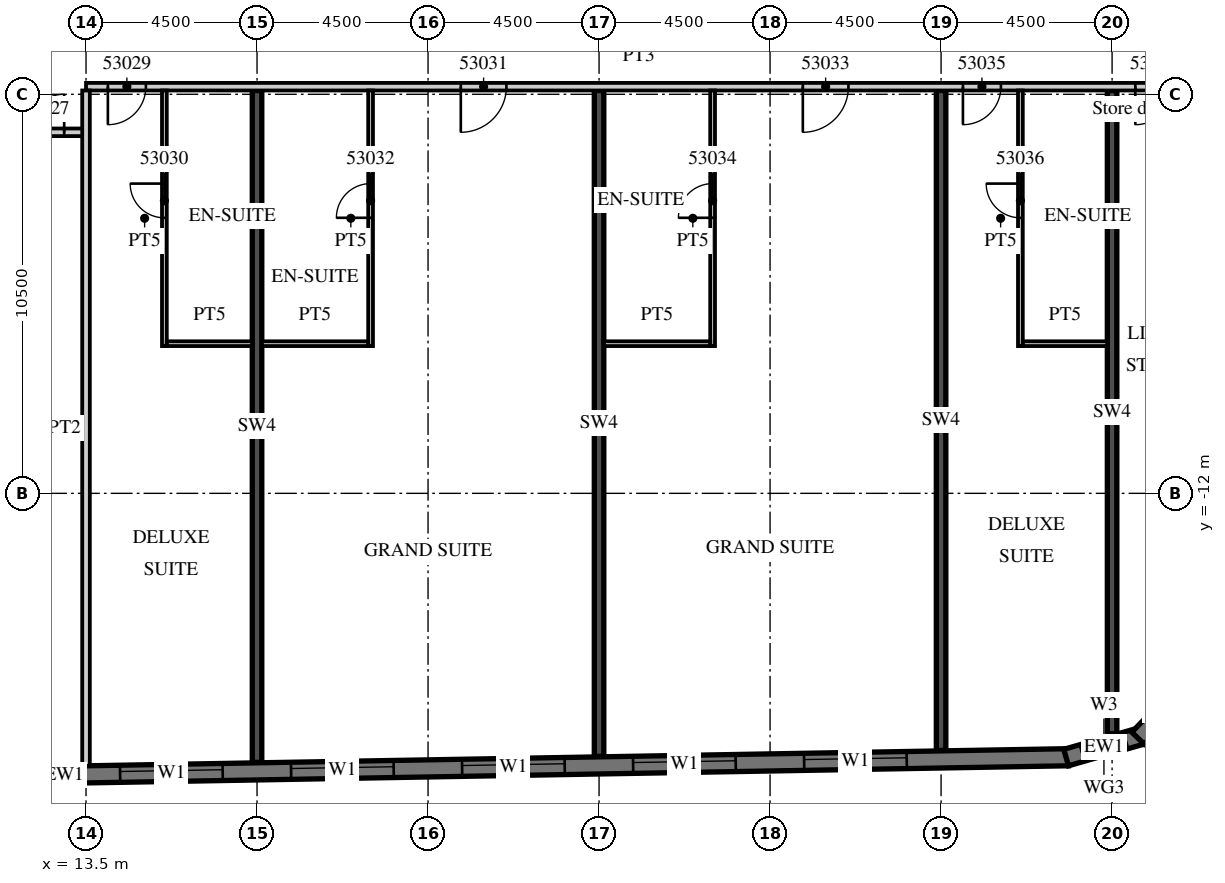
"""IFC4 building model, lengths in metres.
Left out: names, types, materials, properties, quantities, classifications, styles, units other than length and angle.
Written with IfcOpenShell. Run it as: python <this file> out.ifc"""

import sys

from ifc_helpers import new_model, si_unit, direction, frame, frame_2d, origin, place, context, subcontext, project, spatial, polyline, rectangle, outline, extrude, element, fill, save


model = new_model("IFC4")
c1 = context("Model", 3, precision=1e-05, world=origin(), true_north=direction((0.0, 1.0)))
c2 = subcontext(c1, "Body", "Model", "MODEL_VIEW")
j1 = project(units=[si_unit("LENGTHUNIT", "METRE"), si_unit("PLANEANGLEUNIT", "RADIAN")], contexts=[c1])
p1 = place(None, origin())
s1 = spatial("IfcSite", under=j1, at=p1, CompositionType="ELEMENT")
p2 = place(p1, origin())
s2 = spatial("IfcBuilding", under=s1, at=p2, CompositionType="ELEMENT")
p3 = place(p2, frame((0.0, 0.0, 221.0)))
s3 = spatial("IfcBuildingStorey", under=s2, at=p3, CompositionType="ELEMENT", Elevation=221.0)
p4 = place(p3, frame((18.0, -19.079, 0.0), z_axis=(0.0, 0.0, 1.0), x_axis=(0.0, 1.0, 0.0)))
e1 = element("IfcWall", 1, at=p4, inside=s3, PredefinedType="SHEAR", context=c2, shape_type="SweptSolid", body=[
    extrude(rectangle(XDim=17.679, YDim=0.25, at=frame_2d((8.84, 0.0))), origin(), (0.0, 0.0, 1.0), 3.3),
])
p5 = place(p3, frame((27.0, -18.922, 0.0), z_axis=(0.0, 0.0, 1.0), x_axis=(0.0, 1.0, 0.0)))
e2 = element("IfcWall", 2, at=p5, inside=s3, PredefinedType="SHEAR", context=c2, shape_type="SweptSolid", body=[
    extrude(rectangle(XDim=17.522, YDim=0.25, at=frame_2d((8.761, 0.0))), origin(), (0.0, 0.0, 1.0), 3.3),
])
p6 = place(p3, frame((36.0, -18.765, 0.0), z_axis=(0.0, 0.0, 1.0), x_axis=(0.0, 1.0, 0.0)))
e3 = element("IfcWall", 3, at=p6, inside=s3, PredefinedType="SHEAR", context=c2, shape_type="SweptSolid", body=[
    extrude(rectangle(XDim=17.365, YDim=0.25, at=frame_2d((8.683, 0.0))), origin(), (0.0, 0.0, 1.0), 3.3),
])
p7 = place(p3, frame((40.5, -18.325, 0.0), z_axis=(0.0, 0.0, 1.0), x_axis=(0.0, 1.0, 0.0)))
e4 = element("IfcWall", 4, at=p7, inside=s3, PredefinedType="SHEAR", context=c2, shape_type="SweptSolid", body=[
    extrude(rectangle(XDim=16.925, YDim=0.25, at=frame_2d((8.463, 0.0))), origin(), (0.0, 0.0, 1.0), 3.3),
])
p8 = place(p3, frame((-13.504, -19.866, 0.0), z_axis=(0.0, 0.0, 1.0), x_axis=(0.999847672978, 0.017453676992, 0.0)))
e5 = element("IfcWall", 5, at=p8, inside=s3, PredefinedType="SOLIDWALL", context=c2, shape_type="SweptSolid", body=[
    extrude(rectangle(XDim=52.86, YDim=0.45, at=frame_2d((26.43, 0.0))), origin(), (0.0, 0.0, 1.0), 3.02),
])
p9 = place(p8, frame((0.9, 0.0, 0.45)))
e6 = element("IfcOpeningElement", 6, at=p9, cuts=e5, PredefinedType="OPENING", context=c2, shape_type="SweptSolid", body=[
    extrude(rectangle(XDim=2.7, YDim=2.25, at=frame_2d((1.35, 1.125))), frame((0.0, 0.235, 0.0), z_axis=(0.0, -1.0, 0.0), x_axis=(1.0, 0.0, 0.0)), (0.0, 0.0, 1.0), 0.47),
])
p10 = place(p8, frame((5.401, 0.0, 0.45)))
e7 = element("IfcOpeningElement", 7, at=p10, cuts=e5, PredefinedType="OPENING", context=c2, shape_type="SweptSolid", body=[
    extrude(rectangle(XDim=2.7, YDim=2.25, at=frame_2d((1.35, 1.125))), frame((0.0, 0.235, 0.0), z_axis=(0.0, -1.0, 0.0), x_axis=(1.0, 0.0, 0.0)), (0.0, 0.0, 1.0), 0.47),
])
p11 = place(p8, frame((9.902, 0.0, 0.45)))
e8 = element("IfcOpeningElement", 8, at=p11, cuts=e5, PredefinedType="OPENING", context=c2, shape_type="SweptSolid", body=[
    extrude(rectangle(XDim=2.7, YDim=2.25, at=frame_2d((1.35, 1.125))), frame((0.0, 0.235, 0.0), z_axis=(0.0, -1.0, 0.0), x_axis=(1.0, 0.0, 0.0)), (0.0, 0.0, 1.0), 0.47),
])
p12 = place(p8, frame((14.402, 0.0, 0.45)))
e9 = element("IfcOpeningElement", 9, at=p12, cuts=e5, PredefinedType="OPENING", context=c2, shape_type="SweptSolid", body=[
    extrude(rectangle(XDim=2.7, YDim=2.25, at=frame_2d((1.35, 1.125))), frame((0.0, 0.235, 0.0), z_axis=(0.0, -1.0, 0.0), x_axis=(1.0, 0.0, 0.0)), (0.0, 0.0, 1.0), 0.47),
])
p13 = place(p8, frame((18.903, 0.0, 0.45)))
e10 = element("IfcOpeningElement", 10, at=p13, cuts=e5, PredefinedType="OPENING", context=c2, shape_type="SweptSolid", body=[
    extrude(rectangle(XDim=2.7, YDim=2.25, at=frame_2d((1.35, 1.125))), frame((0.0, 0.235, 0.0), z_axis=(0.0, -1.0, 0.0), x_axis=(1.0, 0.0, 0.0)), (0.0, 0.0, 1.0), 0.47),
])
p14 = place(p8, frame((23.404, 0.0, 0.45)))
e11 = element("IfcOpeningElement", 11, at=p14, cuts=e5, PredefinedType="OPENING", context=c2, shape_type="SweptSolid", body=[
    extrude(rectangle(XDim=2.7, YDim=2.25, at=frame_2d((1.35, 1.125))), frame((0.0, 0.235, 0.0), z_axis=(0.0, -1.0, 0.0), x_axis=(1.0, 0.0, 0.0)), (0.0, 0.0, 1.0), 0.47),
])
p15 = place(p8, frame((27.904, 0.0, 0.45)))
e12 = element("IfcOpeningElement", 12, at=p15, cuts=e5, PredefinedType="OPENING", context=c2, shape_type="SweptSolid", body=[
    extrude(rectangle(XDim=2.7, YDim=2.25, at=frame_2d((1.35, 1.125))), frame((0.0, 0.235, 0.0), z_axis=(0.0, -1.0, 0.0), x_axis=(1.0, 0.0, 0.0)), (0.0, 0.0, 1.0), 0.47),
])
p16 = place(p8, frame((32.405, 0.0, 0.45)))
e13 = element("IfcOpeningElement", 13, at=p16, cuts=e5, PredefinedType="OPENING", context=c2, shape_type="SweptSolid", body=[
    extrude(rectangle(XDim=2.7, YDim=2.25, at=frame_2d((1.35, 1.125))), frame((0.0, 0.235, 0.0), z_axis=(0.0, -1.0, 0.0), x_axis=(1.0, 0.0, 0.0)), (0.0, 0.0, 1.0), 0.47),
])
p17 = place(p8, frame((36.906, 0.0, 0.45)))
e14 = element("IfcOpeningElement", 14, at=p17, cuts=e5, PredefinedType="OPENING", context=c2, shape_type="SweptSolid", body=[
    extrude(rectangle(XDim=2.7, YDim=2.25, at=frame_2d((1.35, 1.125))), frame((0.0, 0.235, 0.0), z_axis=(0.0, -1.0, 0.0), x_axis=(1.0, 0.0, 0.0)), (0.0, 0.0, 1.0), 0.47),
])
p18 = place(p8, frame((41.406, 0.0, 0.45)))
e15 = element("IfcOpeningElement", 15, at=p18, cuts=e5, PredefinedType="OPENING", context=c2, shape_type="SweptSolid", body=[
    extrude(rectangle(XDim=2.7, YDim=2.25, at=frame_2d((1.35, 1.125))), frame((0.0, 0.235, 0.0), z_axis=(0.0, -1.0, 0.0), x_axis=(1.0, 0.0, 0.0)), (0.0, 0.0, 1.0), 0.47),
])
p19 = place(p8, frame((45.907, 0.0, 0.45)))
e16 = element("IfcOpeningElement", 16, at=p19, cuts=e5, PredefinedType="OPENING", context=c2, shape_type="SweptSolid", body=[
    extrude(rectangle(XDim=2.7, YDim=2.25, at=frame_2d((1.35, 1.125))), frame((0.0, 0.235, 0.0), z_axis=(0.0, -1.0, 0.0), x_axis=(1.0, 0.0, 0.0)), (0.0, 0.0, 1.0), 0.47),
])
p20 = place(p3, frame((39.29, -18.952, 0.0), z_axis=(0.0, 0.0, 1.0), x_axis=(0.961247584925, 0.275686562016, 0.0)))
e17 = element("IfcWall", 17, at=p20, inside=s3, PredefinedType="SOLIDWALL", context=c2, shape_type="SweptSolid", body=[
    extrude(outline(polyline([(0.0, -0.225), (2.071, -0.225), (1.95, 0.225), (0.121, 0.225), (0.0, -0.225)])), origin(), (0.0, 0.0, 1.0), 3.02),
])
p21 = place(p20, frame((0.435, 0.0, 0.45)))
e18 = element("IfcOpeningElement", 18, at=p21, cuts=e17, PredefinedType="OPENING", context=c2, shape_type="SweptSolid", body=[
    extrude(rectangle(XDim=1.2, YDim=2.25, at=frame_2d((0.6, 1.125))), frame((0.0, 0.235, 0.0), z_axis=(0.0, -1.0, 0.0), x_axis=(1.0, 0.0, 0.0)), (0.0, 0.0, 1.0), 0.47),
])
p22 = place(p3, frame((41.181, -18.442, 0.0), z_axis=(0.0, 0.0, 1.0), x_axis=(0.694678672846, 0.719320193998, 0.0)))
e19 = element("IfcWall", 19, at=p22, inside=s3, PredefinedType="SOLIDWALL", context=c2, shape_type="SweptSolid", body=[
    extrude(outline(polyline([(0.0, -0.225), (2.071, -0.225), (1.95, 0.225), (0.121, 0.225), (0.0, -0.225)])), origin(), (0.0, 0.0, 1.0), 3.02),
])
p23 = place(p3, frame((-13.5, -2.5, 0.0), z_axis=(0.0, 0.0, 1.0), x_axis=(1.0, 0.0, 0.0)))
e20 = element("IfcWall", 20, at=p23, inside=s3, PredefinedType="PARTITIONING", context=c2, shape_type="SweptSolid", body=[
    extrude(rectangle(XDim=27.0, YDim=0.2, at=frame_2d((13.5, 0.0))), origin(), (0.0, 0.0, 1.0), 3.02),
])
p24 = place(p23, frame((0.575, 0.0, 0.0)))
e21 = element("IfcOpeningElement", 21, at=p24, cuts=e20, PredefinedType="OPENING", context=c2, shape_type="SweptSolid", body=[
    extrude(rectangle(XDim=1.0, YDim=2.1, at=frame_2d((0.5, 1.05))), frame((0.0, 0.11, 0.0), z_axis=(0.0, -1.0, 0.0), x_axis=(1.0, 0.0, 0.0)), (0.0, 0.0, 1.0), 0.22),
])
p25 = place(p23, frame((6.938, 0.0, 0.0)))
e22 = element("IfcOpeningElement", 22, at=p25, cuts=e20, PredefinedType="OPENING", context=c2, shape_type="SweptSolid", body=[
    extrude(rectangle(XDim=1.2, YDim=2.1, at=frame_2d((0.6, 1.05))), frame((0.0, 0.11, 0.0), z_axis=(0.0, -1.0, 0.0), x_axis=(1.0, 0.0, 0.0)), (0.0, 0.0, 1.0), 0.22),
])
p26 = place(p23, frame((15.938, 0.0, 0.0)))
e23 = element("IfcOpeningElement", 23, at=p26, cuts=e20, PredefinedType="OPENING", context=c2, shape_type="SweptSolid", body=[
    extrude(rectangle(XDim=1.2, YDim=2.1, at=frame_2d((0.6, 1.05))), frame((0.0, 0.11, 0.0), z_axis=(0.0, -1.0, 0.0), x_axis=(1.0, 0.0, 0.0)), (0.0, 0.0, 1.0), 0.22),
])
p27 = place(p23, frame((25.425, 0.0, 0.0)))
e24 = element("IfcOpeningElement", 24, at=p27, cuts=e20, PredefinedType="OPENING", context=c2, shape_type="SweptSolid", body=[
    extrude(rectangle(XDim=1.0, YDim=2.1, at=frame_2d((0.5, 1.05))), frame((0.0, 0.11, 0.0), z_axis=(0.0, -1.0, 0.0), x_axis=(1.0, 0.0, 0.0)), (0.0, 0.0, 1.0), 0.22),
])
p28 = place(p3, frame((13.5, -1.3, 0.0), z_axis=(0.0, 0.0, 1.0), x_axis=(1.0, 0.0, 0.0)))
e25 = element("IfcWall", 25, at=p28, inside=s3, PredefinedType="PARTITIONING", context=c2, shape_type="SweptSolid", body=[
    extrude(rectangle(XDim=29.091, YDim=0.2, at=frame_2d((14.545, 0.0))), origin(), (0.0, 0.0, 1.0), 3.02),
])
p29 = place(p28, frame((0.575, 0.0, 0.0)))
e26 = element("IfcOpeningElement", 26, at=p29, cuts=e25, PredefinedType="OPENING", context=c2, shape_type="SweptSolid", body=[
    extrude(rectangle(XDim=1.0, YDim=2.1, at=frame_2d((0.5, 1.05))), frame((0.0, 0.11, 0.0), z_axis=(0.0, -1.0, 0.0), x_axis=(1.0, 0.0, 0.0)), (0.0, 0.0, 1.0), 0.22),
])
p30 = place(p28, frame((9.862, 0.0, 0.0)))
e27 = element("IfcOpeningElement", 27, at=p30, cuts=e25, PredefinedType="OPENING", context=c2, shape_type="SweptSolid", body=[
    extrude(rectangle(XDim=1.2, YDim=2.1, at=frame_2d((0.6, 1.05))), frame((0.0, 0.11, 0.0), z_axis=(0.0, -1.0, 0.0), x_axis=(1.0, 0.0, 0.0)), (0.0, 0.0, 1.0), 0.22),
])
p31 = place(p28, frame((18.862, 0.0, 0.0)))
e28 = element("IfcOpeningElement", 28, at=p31, cuts=e25, PredefinedType="OPENING", context=c2, shape_type="SweptSolid", body=[
    extrude(rectangle(XDim=1.2, YDim=2.1, at=frame_2d((0.6, 1.05))), frame((0.0, 0.11, 0.0), z_axis=(0.0, -1.0, 0.0), x_axis=(1.0, 0.0, 0.0)), (0.0, 0.0, 1.0), 0.22),
])
p32 = place(p28, frame((23.075, 0.0, 0.0)))
e29 = element("IfcOpeningElement", 29, at=p32, cuts=e25, PredefinedType="OPENING", context=c2, shape_type="SweptSolid", body=[
    extrude(rectangle(XDim=1.0, YDim=2.1, at=frame_2d((0.5, 1.05))), frame((0.0, 0.11, 0.0), z_axis=(0.0, -1.0, 0.0), x_axis=(1.0, 0.0, 0.0)), (0.0, 0.0, 1.0), 0.22),
])
p33 = place(p28, frame((27.611, 0.0, 0.0)))
e30 = element("IfcOpeningElement", 30, at=p33, cuts=e25, PredefinedType="OPENING", context=c2, shape_type="SweptSolid", body=[
    extrude(rectangle(XDim=1.0, YDim=2.4, at=frame_2d((0.5, 1.2))), frame((0.0, 0.11, 0.0), z_axis=(0.0, -1.0, 0.0), x_axis=(1.0, 0.0, 0.0)), (0.0, 0.0, 1.0), 0.22),
])
p34 = place(p3, frame((13.5, -19.17, 0.0), z_axis=(0.0, 0.0, 1.0), x_axis=(0.0, 1.0, 0.0)))
e31 = element("IfcWall", 31, at=p34, inside=s3, PredefinedType="PARTITIONING", context=c2, shape_type="SweptSolid", body=[
    extrude(rectangle(XDim=17.77, YDim=0.2, at=frame_2d((8.885, 0.0))), origin(), (0.0, 0.0, 1.0), 3.02),
])
p35 = place(p3, frame((15.562, -8.125, 0.0), z_axis=(0.0, 0.0, 1.0), x_axis=(0.0, 1.0, 0.0)))
e32 = element("IfcWall", 32, at=p35, inside=s3, PredefinedType="PARTITIONING", context=c2, shape_type="SweptSolid", body=[
    extrude(rectangle(XDim=6.725, YDim=0.125, at=frame_2d((3.363, 0.0))), origin(), (0.0, 0.0, 1.0), 3.02),
])
p36 = place(p35, frame((3.375, 0.0, 0.0)))
e33 = element("IfcOpeningElement", 33, at=p36, cuts=e32, PredefinedType="OPENING", context=c2, shape_type="SweptSolid", body=[
    extrude(rectangle(XDim=0.9, YDim=2.1, at=frame_2d((0.45, 1.05))), frame((0.0, 0.073, 0.0), z_axis=(0.0, -1.0, 0.0), x_axis=(1.0, 0.0, 0.0)), (0.0, 0.0, 1.0), 0.145),
])
p37 = place(p3, frame((15.625, -8.062, 0.0), z_axis=(0.0, 0.0, 1.0), x_axis=(1.0, 0.0, 0.0)))
e34 = element("IfcWall", 34, at=p37, inside=s3, PredefinedType="PARTITIONING", context=c2, shape_type="SweptSolid", body=[
    extrude(rectangle(XDim=2.25, YDim=0.125, at=frame_2d((1.125, 0.0))), origin(), (0.0, 0.0, 1.0), 3.02),
])
p38 = place(p3, frame((20.988, -8.125, 0.0), z_axis=(0.0, 0.0, 1.0), x_axis=(0.0, 1.0, 0.0)))
e35 = element("IfcWall", 35, at=p38, inside=s3, PredefinedType="PARTITIONING", context=c2, shape_type="SweptSolid", body=[
    extrude(rectangle(XDim=6.725, YDim=0.125, at=frame_2d((3.363, 0.0))), origin(), (0.0, 0.0, 1.0), 3.02),
])
p39 = place(p38, frame((3.375, 0.0, 0.0)))
e36 = element("IfcOpeningElement", 36, at=p39, cuts=e35, PredefinedType="OPENING", context=c2, shape_type="SweptSolid", body=[
    extrude(rectangle(XDim=0.9, YDim=2.1, at=frame_2d((0.45, 1.05))), frame((0.0, 0.073, 0.0), z_axis=(0.0, -1.0, 0.0), x_axis=(1.0, 0.0, 0.0)), (0.0, 0.0, 1.0), 0.145),
])
p40 = place(p3, frame((18.125, -8.062, 0.0), z_axis=(0.0, 0.0, 1.0), x_axis=(1.0, 0.0, 0.0)))
e37 = element("IfcWall", 37, at=p40, inside=s3, PredefinedType="PARTITIONING", context=c2, shape_type="SweptSolid", body=[
    extrude(rectangle(XDim=2.8, YDim=0.125, at=frame_2d((1.4, 0.0))), origin(), (0.0, 0.0, 1.0), 3.02),
])
p41 = place(p3, frame((29.988, -8.125, 0.0), z_axis=(0.0, 0.0, 1.0), x_axis=(0.0, 1.0, 0.0)))
e38 = element("IfcWall", 38, at=p41, inside=s3, PredefinedType="PARTITIONING", context=c2, shape_type="SweptSolid", body=[
    extrude(rectangle(XDim=6.725, YDim=0.125, at=frame_2d((3.363, 0.0))), origin(), (0.0, 0.0, 1.0), 3.02),
])
p42 = place(p41, frame((3.375, 0.0, 0.0)))
e39 = element("IfcOpeningElement", 39, at=p42, cuts=e38, PredefinedType="OPENING", context=c2, shape_type="SweptSolid", body=[
    extrude(rectangle(XDim=0.9, YDim=2.1, at=frame_2d((0.45, 1.05))), frame((0.0, 0.073, 0.0), z_axis=(0.0, -1.0, 0.0), x_axis=(1.0, 0.0, 0.0)), (0.0, 0.0, 1.0), 0.145),
])
p43 = place(p3, frame((27.125, -8.062, 0.0), z_axis=(0.0, 0.0, 1.0), x_axis=(1.0, 0.0, 0.0)))
e40 = element("IfcWall", 40, at=p43, inside=s3, PredefinedType="PARTITIONING", context=c2, shape_type="SweptSolid", body=[
    extrude(rectangle(XDim=2.8, YDim=0.125, at=frame_2d((1.4, 0.0))), origin(), (0.0, 0.0, 1.0), 3.02),
])
p44 = place(p3, frame((38.087, -8.125, 0.0), z_axis=(0.0, 0.0, 1.0), x_axis=(0.0, 1.0, 0.0)))
e41 = element("IfcWall", 41, at=p44, inside=s3, PredefinedType="PARTITIONING", context=c2, shape_type="SweptSolid", body=[
    extrude(rectangle(XDim=6.725, YDim=0.125, at=frame_2d((3.363, 0.0))), origin(), (0.0, 0.0, 1.0), 3.02),
])
p45 = place(p44, frame((3.375, 0.0, 0.0)))
e42 = element("IfcOpeningElement", 42, at=p45, cuts=e41, PredefinedType="OPENING", context=c2, shape_type="SweptSolid", body=[
    extrude(rectangle(XDim=0.9, YDim=2.1, at=frame_2d((0.45, 1.05))), frame((0.0, 0.073, 0.0), z_axis=(0.0, -1.0, 0.0), x_axis=(1.0, 0.0, 0.0)), (0.0, 0.0, 1.0), 0.145),
])
p46 = place(p3, frame((38.15, -8.062, 0.0), z_axis=(0.0, 0.0, 1.0), x_axis=(1.0, 0.0, 0.0)))
e43 = element("IfcWall", 43, at=p46, inside=s3, PredefinedType="PARTITIONING", context=c2, shape_type="SweptSolid", body=[
    extrude(rectangle(XDim=2.225, YDim=0.125, at=frame_2d((1.113, 0.0))), origin(), (0.0, 0.0, 1.0), 3.02),
])
p47 = place(p15, origin())
e44 = element("IfcWindow", 44, at=p47, inside=s3, PartitioningType="SINGLE_PANEL", PredefinedType="WINDOW", context=c2, shape_type="SweptSolid", body=[
    extrude(rectangle(XDim=2.7, YDim=2.25, at=frame_2d((1.35, 1.125))), frame((0.0, 0.09, 0.0), z_axis=(0.0, -1.0, 0.0), x_axis=(1.0, 0.0, 0.0)), (0.0, 0.0, 1.0), 0.06),
])
fill(e12, e44)
p48 = place(p16, origin())
e45 = element("IfcWindow", 45, at=p48, inside=s3, PartitioningType="SINGLE_PANEL", PredefinedType="WINDOW", context=c2, shape_type="SweptSolid", body=[
    extrude(rectangle(XDim=2.7, YDim=2.25, at=frame_2d((1.35, 1.125))), frame((0.0, 0.09, 0.0), z_axis=(0.0, -1.0, 0.0), x_axis=(1.0, 0.0, 0.0)), (0.0, 0.0, 1.0), 0.06),
])
fill(e13, e45)
p49 = place(p17, origin())
e46 = element("IfcWindow", 46, at=p49, inside=s3, PartitioningType="SINGLE_PANEL", PredefinedType="WINDOW", context=c2, shape_type="SweptSolid", body=[
    extrude(rectangle(XDim=2.7, YDim=2.25, at=frame_2d((1.35, 1.125))), frame((0.0, 0.09, 0.0), z_axis=(0.0, -1.0, 0.0), x_axis=(1.0, 0.0, 0.0)), (0.0, 0.0, 1.0), 0.06),
])
fill(e14, e46)
p50 = place(p18, origin())
e47 = element("IfcWindow", 47, at=p50, inside=s3, PartitioningType="SINGLE_PANEL", PredefinedType="WINDOW", context=c2, shape_type="SweptSolid", body=[
    extrude(rectangle(XDim=2.7, YDim=2.25, at=frame_2d((1.35, 1.125))), frame((0.0, 0.09, 0.0), z_axis=(0.0, -1.0, 0.0), x_axis=(1.0, 0.0, 0.0)), (0.0, 0.0, 1.0), 0.06),
])
fill(e15, e47)
p51 = place(p19, origin())
e48 = element("IfcWindow", 48, at=p51, inside=s3, PartitioningType="SINGLE_PANEL", PredefinedType="WINDOW", context=c2, shape_type="SweptSolid", body=[
    extrude(rectangle(XDim=2.7, YDim=2.25, at=frame_2d((1.35, 1.125))), frame((0.0, 0.09, 0.0), z_axis=(0.0, -1.0, 0.0), x_axis=(1.0, 0.0, 0.0)), (0.0, 0.0, 1.0), 0.06),
])
fill(e16, e48)
p52 = place(p21, origin())
e49 = element("IfcWindow", 49, at=p52, inside=s3, PartitioningType="SINGLE_PANEL", PredefinedType="WINDOW", context=c2, shape_type="SweptSolid", body=[
    extrude(rectangle(XDim=1.2, YDim=2.25, at=frame_2d((0.6, 1.125))), frame((0.0, 0.09, 0.0), z_axis=(0.0, -1.0, 0.0), x_axis=(1.0, 0.0, 0.0)), (0.0, 0.0, 1.0), 0.06),
])
fill(e18, e49)
p53 = place(p27, origin())
e50 = element("IfcDoor", 50, at=p53, inside=s3, OperationType="SINGLE_SWING_RIGHT", PredefinedType="DOOR", context=c2, shape_type="SweptSolid", body=[
    extrude(rectangle(XDim=1.0, YDim=2.1, at=frame_2d((0.5, 1.05))), frame((0.0, 0.025, 0.0), z_axis=(0.0, -1.0, 0.0), x_axis=(1.0, 0.0, 0.0)), (0.0, 0.0, 1.0), 0.05),
])
fill(e24, e50)
p54 = place(p29, origin())
e51 = element("IfcDoor", 51, at=p54, inside=s3, OperationType="SINGLE_SWING_LEFT", PredefinedType="DOOR", context=c2, shape_type="SweptSolid", body=[
    extrude(rectangle(XDim=1.0, YDim=2.1, at=frame_2d((0.5, 1.05))), frame((0.0, 0.025, 0.0), z_axis=(0.0, -1.0, 0.0), x_axis=(1.0, 0.0, 0.0)), (0.0, 0.0, 1.0), 0.05),
])
fill(e26, e51)
p55 = place(p36, origin())
e52 = element("IfcDoor", 52, at=p55, inside=s3, OperationType="SINGLE_SWING_RIGHT", PredefinedType="DOOR", context=c2, shape_type="SweptSolid", body=[
    extrude(rectangle(XDim=0.9, YDim=2.1, at=frame_2d((0.45, 1.05))), frame((0.0, 0.025, 0.0), z_axis=(0.0, -1.0, 0.0), x_axis=(1.0, 0.0, 0.0)), (0.0, 0.0, 1.0), 0.05),
])
fill(e33, e52)
p56 = place(p30, origin())
e53 = element("IfcDoor", 53, at=p56, inside=s3, OperationType="SINGLE_SWING_LEFT", PredefinedType="DOOR", context=c2, shape_type="SweptSolid", body=[
    extrude(rectangle(XDim=1.2, YDim=2.1, at=frame_2d((0.6, 1.05))), frame((0.0, 0.025, 0.0), z_axis=(0.0, -1.0, 0.0), x_axis=(1.0, 0.0, 0.0)), (0.0, 0.0, 1.0), 0.05),
])
fill(e27, e53)
p57 = place(p39, origin())
e54 = element("IfcDoor", 54, at=p57, inside=s3, OperationType="SINGLE_SWING_LEFT", PredefinedType="DOOR", context=c2, shape_type="SweptSolid", body=[
    extrude(rectangle(XDim=0.9, YDim=2.1, at=frame_2d((0.45, 1.05))), frame((0.0, 0.025, 0.0), z_axis=(0.0, -1.0, 0.0), x_axis=(1.0, 0.0, 0.0)), (0.0, 0.0, 1.0), 0.05),
])
fill(e36, e54)
p58 = place(p31, origin())
e55 = element("IfcDoor", 55, at=p58, inside=s3, OperationType="SINGLE_SWING_LEFT", PredefinedType="DOOR", context=c2, shape_type="SweptSolid", body=[
    extrude(rectangle(XDim=1.2, YDim=2.1, at=frame_2d((0.6, 1.05))), frame((0.0, 0.025, 0.0), z_axis=(0.0, -1.0, 0.0), x_axis=(1.0, 0.0, 0.0)), (0.0, 0.0, 1.0), 0.05),
])
fill(e28, e55)
p59 = place(p42, origin())
e56 = element("IfcDoor", 56, at=p59, inside=s3, OperationType="SINGLE_SWING_LEFT", PredefinedType="DOOR", context=c2, shape_type="SweptSolid", body=[
    extrude(rectangle(XDim=0.9, YDim=2.1, at=frame_2d((0.45, 1.05))), frame((0.0, 0.025, 0.0), z_axis=(0.0, -1.0, 0.0), x_axis=(1.0, 0.0, 0.0)), (0.0, 0.0, 1.0), 0.05),
])
fill(e39, e56)
p60 = place(p32, origin())
e57 = element("IfcDoor", 57, at=p60, inside=s3, OperationType="SINGLE_SWING_LEFT", PredefinedType="DOOR", context=c2, shape_type="SweptSolid", body=[
    extrude(rectangle(XDim=1.0, YDim=2.1, at=frame_2d((0.5, 1.05))), frame((0.0, 0.025, 0.0), z_axis=(0.0, -1.0, 0.0), x_axis=(1.0, 0.0, 0.0)), (0.0, 0.0, 1.0), 0.05),
])
fill(e29, e57)
p61 = place(p45, origin())
e58 = element("IfcDoor", 58, at=p61, inside=s3, OperationType="SINGLE_SWING_RIGHT", PredefinedType="DOOR", context=c2, shape_type="SweptSolid", body=[
    extrude(rectangle(XDim=0.9, YDim=2.1, at=frame_2d((0.45, 1.05))), frame((0.0, 0.025, 0.0), z_axis=(0.0, -1.0, 0.0), x_axis=(1.0, 0.0, 0.0)), (0.0, 0.0, 1.0), 0.05),
])
fill(e42, e58)
p62 = place(p33, origin())
e59 = element("IfcDoor", 59, at=p62, inside=s3, OperationType="SINGLE_SWING_LEFT", PredefinedType="DOOR", context=c2, shape_type="SweptSolid", body=[
    extrude(rectangle(XDim=1.0, YDim=2.4, at=frame_2d((0.5, 1.2))), frame((0.0, 0.025, 0.0), z_axis=(0.0, -1.0, 0.0), x_axis=(1.0, 0.0, 0.0)), (0.0, 0.0, 1.0), 0.05),
])
fill(e30, e59)
save(model, sys.argv[1])
